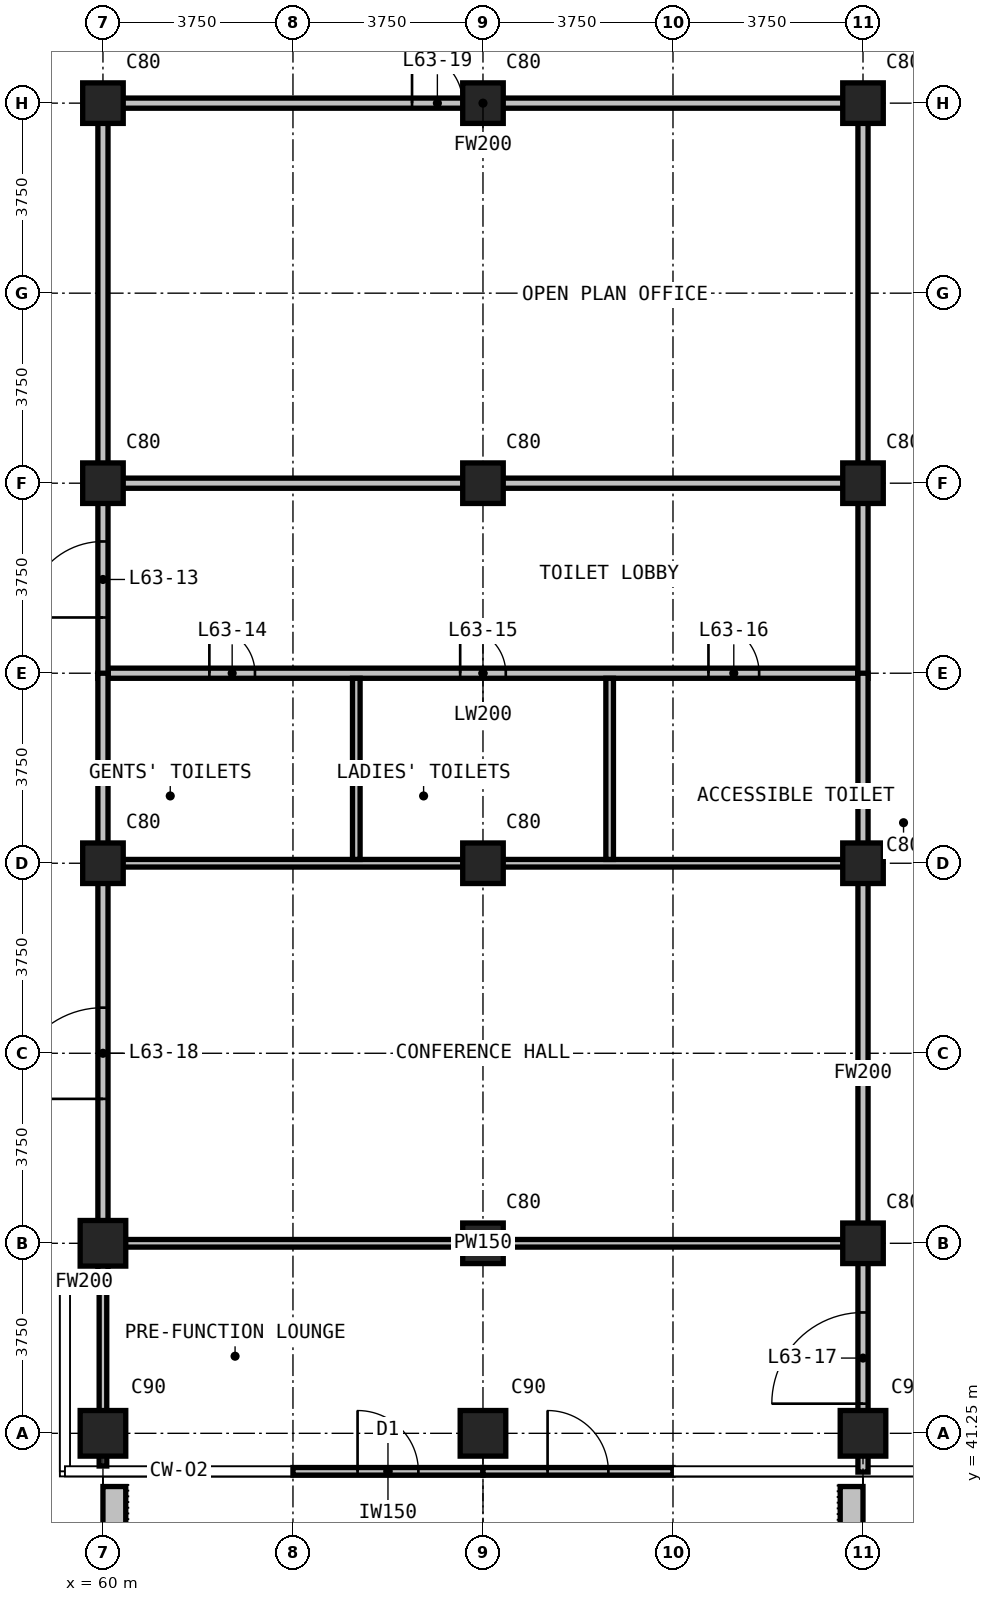
"""IFC4 building model, lengths in metres.
Left out: names, types, materials, properties, quantities, classifications, styles, units other than length and angle.
Written with IfcOpenShell. Run it as: python <this file> out.ifc"""

import sys

from ifc_helpers import new_model, si_unit, direction, frame, frame_2d, origin, origin_2d, place, context, subcontext, project, spatial, rectangle, extrude, element, fill, save


model = new_model("IFC4")
c1 = context("Model", 3, precision=1e-05, world=origin(), true_north=direction((0.0, 1.0)))
c2 = subcontext(c1, "Body", "Model", "MODEL_VIEW")
j1 = project(units=[si_unit("LENGTHUNIT", "METRE"), si_unit("PLANEANGLEUNIT", "RADIAN")], contexts=[c1])
p1 = place(None, origin())
s1 = spatial("IfcSite", under=j1, at=p1, CompositionType="ELEMENT")
p2 = place(p1, origin())
s2 = spatial("IfcBuilding", under=s1, at=p2, CompositionType="ELEMENT")
p3 = place(p2, frame((0.0, 0.0, 242.7)))
s3 = spatial("IfcBuildingStorey", under=s2, at=p3, CompositionType="ELEMENT", Elevation=242.7)
for number, where, z_axis, x_axis in (
    (1, (60.0, 41.25, 0.0), (0.0, 0.0, 1.0), (1.0, 0.0, 0.0)),
    (2, (60.0, 45.0, 0.0), (0.0, 0.0, 1.0), (1.0, 0.0, 0.0)),
):
    element("IfcColumn", number, at=place(p3, frame(where, z_axis=z_axis, x_axis=x_axis)), inside=s3, PredefinedType="COLUMN", context=c2, shape_type="SweptSolid", body=[
        extrude(rectangle(XDim=0.9, YDim=0.9, at=origin_2d()), origin(), (0.0, 0.0, 1.0), 3.6),
    ])
for number, where, z_axis, x_axis in (
    (3, (60.0, 52.5, 0.0), (0.0, 0.0, 1.0), (1.0, 0.0, 0.0)),
    (4, (60.0, 60.0, 0.0), (0.0, 0.0, 1.0), (1.0, 0.0, 0.0)),
    (5, (60.0, 67.5, 0.0), (0.0, 0.0, 1.0), (1.0, 0.0, 0.0)),
):
    element("IfcColumn", number, at=place(p3, frame(where, z_axis=z_axis, x_axis=x_axis)), inside=s3, PredefinedType="COLUMN", context=c2, shape_type="SweptSolid", body=[
        extrude(rectangle(XDim=0.8, YDim=0.8, at=origin_2d()), origin(), (0.0, 0.0, 1.0), 3.6),
    ])
p4 = place(p3, frame((67.5, 41.25, 0.0), z_axis=(0.0, 0.0, 1.0), x_axis=(1.0, 0.0, 0.0)))
e6 = element("IfcColumn", 6, at=p4, inside=s3, PredefinedType="COLUMN", context=c2, shape_type="SweptSolid", body=[
    extrude(rectangle(XDim=0.9, YDim=0.9, at=origin_2d()), origin(), (0.0, 0.0, 1.0), 3.6),
])
for number, where, z_axis, x_axis in (
    (7, (67.5, 45.0, 0.0), (0.0, 0.0, 1.0), (1.0, 0.0, 0.0)),
    (8, (67.5, 52.5, 0.0), (0.0, 0.0, 1.0), (1.0, 0.0, 0.0)),
    (9, (67.5, 60.0, 0.0), (0.0, 0.0, 1.0), (1.0, 0.0, 0.0)),
    (10, (67.5, 67.5, 0.0), (0.0, 0.0, 1.0), (1.0, 0.0, 0.0)),
):
    element("IfcColumn", number, at=place(p3, frame(where, z_axis=z_axis, x_axis=x_axis)), inside=s3, PredefinedType="COLUMN", context=c2, shape_type="SweptSolid", body=[
        extrude(rectangle(XDim=0.8, YDim=0.8, at=origin_2d()), origin(), (0.0, 0.0, 1.0), 3.6),
    ])
p5 = place(p3, frame((75.0, 41.25, 0.0), z_axis=(0.0, 0.0, 1.0), x_axis=(1.0, 0.0, 0.0)))
e11 = element("IfcColumn", 11, at=p5, inside=s3, PredefinedType="COLUMN", context=c2, shape_type="SweptSolid", body=[
    extrude(rectangle(XDim=0.9, YDim=0.9, at=origin_2d()), origin(), (0.0, 0.0, 1.0), 3.6),
])
for number, where, z_axis, x_axis in (
    (12, (75.0, 45.0, 0.0), (0.0, 0.0, 1.0), (1.0, 0.0, 0.0)),
    (13, (75.0, 52.5, 0.0), (0.0, 0.0, 1.0), (1.0, 0.0, 0.0)),
    (14, (75.0, 60.0, 0.0), (0.0, 0.0, 1.0), (1.0, 0.0, 0.0)),
    (15, (75.0, 67.5, 0.0), (0.0, 0.0, 1.0), (1.0, 0.0, 0.0)),
):
    element("IfcColumn", number, at=place(p3, frame(where, z_axis=z_axis, x_axis=x_axis)), inside=s3, PredefinedType="COLUMN", context=c2, shape_type="SweptSolid", body=[
        extrude(rectangle(XDim=0.8, YDim=0.8, at=origin_2d()), origin(), (0.0, 0.0, 1.0), 3.6),
    ])
p6 = place(p3, frame((63.75, 40.5, 0.0), z_axis=(0.0, 0.0, 1.0), x_axis=(1.0, 0.0, 0.0)))
e16 = element("IfcWall", 16, at=p6, inside=s3, PredefinedType="SOLIDWALL", context=c2, shape_type="SweptSolid", body=[
    extrude(rectangle(XDim=3.75, YDim=0.15, at=frame_2d((1.875, 0.0))), origin(), (0.0, 0.0, 1.0), 3.3),
])
p7 = place(p6, frame((1.275, 0.0, 0.0)))
e17 = element("IfcOpeningElement", 17, at=p7, cuts=e16, PredefinedType="OPENING", context=c2, shape_type="SweptSolid", body=[
    extrude(rectangle(XDim=1.2, YDim=2.4, at=frame_2d((0.6, 1.2))), frame((0.0, 0.085, 0.0), z_axis=(0.0, -1.0, 0.0), x_axis=(1.0, 0.0, 0.0)), (0.0, 0.0, 1.0), 0.17),
])
p8 = place(p3, frame((67.5, 40.5, 0.0), z_axis=(0.0, 0.0, 1.0), x_axis=(1.0, 0.0, 0.0)))
e18 = element("IfcWall", 18, at=p8, inside=s3, PredefinedType="SOLIDWALL", context=c2, shape_type="SweptSolid", body=[
    extrude(rectangle(XDim=3.75, YDim=0.15, at=frame_2d((1.875, 0.0))), origin(), (0.0, 0.0, 1.0), 3.3),
])
p9 = place(p8, frame((1.275, 0.0, 0.0)))
e19 = element("IfcOpeningElement", 19, at=p9, cuts=e18, PredefinedType="OPENING", context=c2, shape_type="SweptSolid", body=[
    extrude(rectangle(XDim=1.2, YDim=2.4, at=frame_2d((0.6, 1.2))), frame((0.0, 0.085, 0.0), z_axis=(0.0, -1.0, 0.0), x_axis=(1.0, 0.0, 0.0)), (0.0, 0.0, 1.0), 0.17),
])
for number, where, z_axis, x_axis in (
    (20, (60.225, 40.2, 0.0), (0.0, 0.0, 1.0), (0.0, -1.0, 0.0)),
    (21, (74.775, 40.2, 0.0), (0.0, 0.0, 1.0), (0.0, -1.0, 0.0)),
):
    element("IfcWall", number, at=place(p3, frame(where, z_axis=z_axis, x_axis=x_axis)), inside=s3, PredefinedType="USERDEFINED", context=c2, shape_type="SweptSolid", body=[
        extrude(rectangle(XDim=2.35, YDim=0.45, at=frame_2d((1.175, 0.0))), origin(), (0.0, 0.0, 1.0), 1.1),
    ])
p10 = place(p3, frame((60.1, 56.25, 0.0), z_axis=(0.0, 0.0, 1.0), x_axis=(1.0, 0.0, 0.0)))
e22 = element("IfcWall", 22, at=p10, inside=s3, PredefinedType="PARTITIONING", context=c2, shape_type="SweptSolid", body=[
    extrude(rectangle(XDim=14.8, YDim=0.2, at=frame_2d((7.4, 0.0))), origin(), (0.0, 0.0, 1.0), 3.3),
])
p11 = place(p10, frame((2.0, 0.0, 0.0)))
e23 = element("IfcOpeningElement", 23, at=p11, cuts=e22, PredefinedType="OPENING", context=c2, shape_type="SweptSolid", body=[
    extrude(rectangle(XDim=0.9, YDim=2.2, at=frame_2d((0.45, 1.1))), frame((0.0, 0.11, 0.0), z_axis=(0.0, -1.0, 0.0), x_axis=(1.0, 0.0, 0.0)), (0.0, 0.0, 1.0), 0.22),
])
p12 = place(p10, frame((6.95, 0.0, 0.0)))
e24 = element("IfcOpeningElement", 24, at=p12, cuts=e22, PredefinedType="OPENING", context=c2, shape_type="SweptSolid", body=[
    extrude(rectangle(XDim=0.9, YDim=2.2, at=frame_2d((0.45, 1.1))), frame((0.0, 0.11, 0.0), z_axis=(0.0, -1.0, 0.0), x_axis=(1.0, 0.0, 0.0)), (0.0, 0.0, 1.0), 0.22),
])
p13 = place(p10, frame((11.85, 0.0, 0.0)))
e25 = element("IfcOpeningElement", 25, at=p13, cuts=e22, PredefinedType="OPENING", context=c2, shape_type="SweptSolid", body=[
    extrude(rectangle(XDim=1.0, YDim=2.2, at=frame_2d((0.5, 1.1))), frame((0.0, 0.11, 0.0), z_axis=(0.0, -1.0, 0.0), x_axis=(1.0, 0.0, 0.0)), (0.0, 0.0, 1.0), 0.22),
])
p14 = place(p3, frame((60.1, 60.0, 0.0), z_axis=(0.0, 0.0, 1.0), x_axis=(1.0, 0.0, 0.0)))
e26 = element("IfcWall", 26, at=p14, inside=s3, PredefinedType="PARTITIONING", context=c2, shape_type="SweptSolid", body=[
    extrude(rectangle(XDim=14.8, YDim=0.2, at=frame_2d((7.4, 0.0))), origin(), (0.0, 0.0, 1.0), 3.3),
])
p15 = place(p3, frame((60.0, 56.15, 0.0), z_axis=(0.0, 0.0, 1.0), x_axis=(0.0, 1.0, 0.0)))
e27 = element("IfcWall", 27, at=p15, inside=s3, PredefinedType="PARTITIONING", context=c2, shape_type="SweptSolid", body=[
    extrude(rectangle(XDim=3.95, YDim=0.2, at=frame_2d((1.975, 0.0))), origin(), (0.0, 0.0, 1.0), 3.3),
])
p16 = place(p15, frame((1.2, 0.0, 0.0)))
e28 = element("IfcOpeningElement", 28, at=p16, cuts=e27, PredefinedType="OPENING", context=c2, shape_type="SweptSolid", body=[
    extrude(rectangle(XDim=1.5, YDim=2.2, at=frame_2d((0.75, 1.1))), frame((0.0, 0.11, 0.0), z_axis=(0.0, -1.0, 0.0), x_axis=(1.0, 0.0, 0.0)), (0.0, 0.0, 1.0), 0.22),
])
p17 = place(p3, frame((75.0, 56.15, 0.0), z_axis=(0.0, 0.0, 1.0), x_axis=(0.0, 1.0, 0.0)))
e29 = element("IfcWall", 29, at=p17, inside=s3, PredefinedType="PARTITIONING", context=c2, shape_type="SweptSolid", body=[
    extrude(rectangle(XDim=3.95, YDim=0.2, at=frame_2d((1.975, 0.0))), origin(), (0.0, 0.0, 1.0), 3.3),
])
p18 = place(p3, frame((59.355, 44.235, 0.0), z_axis=(0.0, 0.0, 1.0), x_axis=(1.0, 0.0, 0.0)))
e30 = element("IfcWall", 30, at=p18, inside=s3, PredefinedType="PARTITIONING", context=c2, shape_type="SweptSolid", body=[
    extrude(rectangle(XDim=0.545, YDim=0.2, at=frame_2d((0.272, 0.0))), origin(), (0.0, 0.0, 1.0), 3.3),
])
p19 = place(p3, frame((60.1, 67.5, 0.0), z_axis=(0.0, 0.0, 1.0), x_axis=(1.0, 0.0, 0.0)))
e31 = element("IfcWall", 31, at=p19, inside=s3, PredefinedType="PARTITIONING", context=c2, shape_type="SweptSolid", body=[
    extrude(rectangle(XDim=14.8, YDim=0.2, at=frame_2d((7.4, 0.0))), origin(), (0.0, 0.0, 1.0), 3.3),
])
p20 = place(p19, frame((6.0, 0.0, 0.0)))
e32 = element("IfcOpeningElement", 32, at=p20, cuts=e31, PredefinedType="OPENING", context=c2, shape_type="SweptSolid", body=[
    extrude(rectangle(XDim=1.0, YDim=2.2, at=frame_2d((0.5, 1.1))), frame((0.0, 0.11, 0.0), z_axis=(0.0, -1.0, 0.0), x_axis=(1.0, 0.0, 0.0)), (0.0, 0.0, 1.0), 0.22),
])
p21 = place(p3, frame((60.0, 44.135, 0.0), z_axis=(0.0, 0.0, 1.0), x_axis=(0.0, 1.0, 0.0)))
e33 = element("IfcWall", 33, at=p21, inside=s3, PredefinedType="PARTITIONING", context=c2, shape_type="SweptSolid", body=[
    extrude(rectangle(XDim=12.115, YDim=0.2, at=frame_2d((6.058, 0.0))), origin(), (0.0, 0.0, 1.0), 3.3),
])
p22 = place(p21, frame((3.715, 0.0, 0.0)))
e34 = element("IfcOpeningElement", 34, at=p22, cuts=e33, PredefinedType="OPENING", context=c2, shape_type="SweptSolid", body=[
    extrude(rectangle(XDim=1.8, YDim=2.2, at=frame_2d((0.9, 1.1))), frame((0.0, 0.11, 0.0), z_axis=(0.0, -1.0, 0.0), x_axis=(1.0, 0.0, 0.0)), (0.0, 0.0, 1.0), 0.22),
])
p23 = place(p3, frame((60.0, 60.0, 0.0), z_axis=(0.0, 0.0, 1.0), x_axis=(0.0, 1.0, 0.0)))
e35 = element("IfcWall", 35, at=p23, inside=s3, PredefinedType="PARTITIONING", context=c2, shape_type="SweptSolid", body=[
    extrude(rectangle(XDim=7.6, YDim=0.2, at=frame_2d((3.8, 0.0))), origin(), (0.0, 0.0, 1.0), 3.3),
])
p24 = place(p3, frame((75.0, 40.485, 0.0), z_axis=(0.0, 0.0, 1.0), x_axis=(0.0, 1.0, 0.0)))
e36 = element("IfcWall", 36, at=p24, inside=s3, PredefinedType="PARTITIONING", context=c2, shape_type="SweptSolid", body=[
    extrude(rectangle(XDim=15.765, YDim=0.2, at=frame_2d((7.882, 0.0))), origin(), (0.0, 0.0, 1.0), 3.3),
])
p25 = place(p24, frame((1.35, 0.0, 0.0)))
e37 = element("IfcOpeningElement", 37, at=p25, cuts=e36, PredefinedType="OPENING", context=c2, shape_type="SweptSolid", body=[
    extrude(rectangle(XDim=1.8, YDim=2.2, at=frame_2d((0.9, 1.1))), frame((0.0, 0.11, 0.0), z_axis=(0.0, -1.0, 0.0), x_axis=(1.0, 0.0, 0.0)), (0.0, 0.0, 1.0), 0.22),
])
p26 = place(p3, frame((75.0, 60.0, 0.0), z_axis=(0.0, 0.0, 1.0), x_axis=(0.0, 1.0, 0.0)))
e38 = element("IfcWall", 38, at=p26, inside=s3, PredefinedType="PARTITIONING", context=c2, shape_type="SweptSolid", body=[
    extrude(rectangle(XDim=7.6, YDim=0.2, at=frame_2d((3.8, 0.0))), origin(), (0.0, 0.0, 1.0), 3.3),
])
for number, where, z_axis, x_axis in (
    (39, (60.1, 45.0, 0.0), (0.0, 0.0, 1.0), (1.0, 0.0, 0.0)),
    (40, (60.1, 52.5, 0.0), (0.0, 0.0, 1.0), (1.0, 0.0, 0.0)),
):
    element("IfcWall", number, at=place(p3, frame(where, z_axis=z_axis, x_axis=x_axis)), inside=s3, PredefinedType="PARTITIONING", context=c2, shape_type="SweptSolid", body=[
        extrude(rectangle(XDim=14.8, YDim=0.15, at=frame_2d((7.4, 0.0))), origin(), (0.0, 0.0, 1.0), 3.3),
    ])
p27 = place(p3, frame((60.0, 40.605, 0.0), z_axis=(0.0, 0.0, 1.0), x_axis=(0.0, 1.0, 0.0)))
e41 = element("IfcWall", 41, at=p27, inside=s3, PredefinedType="PARTITIONING", context=c2, shape_type="SweptSolid", body=[
    extrude(rectangle(XDim=3.6, YDim=0.15, at=frame_2d((1.8, 0.0))), origin(), (0.0, 0.0, 1.0), 3.3),
])
for number, where, z_axis, x_axis in (
    (42, (65.0, 52.575, 0.0), (0.0, 0.0, 1.0), (0.0, 1.0, 0.0)),
    (43, (70.0, 52.575, 0.0), (0.0, 0.0, 1.0), (0.0, 1.0, 0.0)),
):
    element("IfcWall", number, at=place(p3, frame(where, z_axis=z_axis, x_axis=x_axis)), inside=s3, PredefinedType="PARTITIONING", context=c2, shape_type="SweptSolid", body=[
        extrude(rectangle(XDim=3.575, YDim=0.15, at=frame_2d((1.788, 0.0))), origin(), (0.0, 0.0, 1.0), 3.3),
    ])
p28 = place(p7, origin())
e44 = element("IfcDoor", 44, at=p28, inside=s3, OperationType="SINGLE_SWING_LEFT", PredefinedType="DOOR", context=c2, shape_type="SweptSolid", body=[
    extrude(rectangle(XDim=1.2, YDim=2.4, at=frame_2d((0.6, 1.2))), frame((0.0, 0.025, 0.0), z_axis=(0.0, -1.0, 0.0), x_axis=(1.0, 0.0, 0.0)), (0.0, 0.0, 1.0), 0.05),
])
fill(e17, e44)
p29 = place(p9, origin())
e45 = element("IfcDoor", 45, at=p29, inside=s3, OperationType="SINGLE_SWING_LEFT", PredefinedType="DOOR", context=c2, shape_type="SweptSolid", body=[
    extrude(rectangle(XDim=1.2, YDim=2.4, at=frame_2d((0.6, 1.2))), frame((0.0, 0.025, 0.0), z_axis=(0.0, -1.0, 0.0), x_axis=(1.0, 0.0, 0.0)), (0.0, 0.0, 1.0), 0.05),
])
fill(e19, e45)
p30 = place(p16, origin())
e46 = element("IfcDoor", 46, at=p30, inside=s3, OperationType="DOUBLE_DOOR_SINGLE_SWING", PredefinedType="DOOR", context=c2, shape_type="SweptSolid", body=[
    extrude(rectangle(XDim=1.5, YDim=2.2, at=frame_2d((0.75, 1.1))), frame((0.0, 0.025, 0.0), z_axis=(0.0, -1.0, 0.0), x_axis=(1.0, 0.0, 0.0)), (0.0, 0.0, 1.0), 0.05),
])
fill(e28, e46)
p31 = place(p11, origin())
e47 = element("IfcDoor", 47, at=p31, inside=s3, OperationType="SINGLE_SWING_LEFT", PredefinedType="DOOR", context=c2, shape_type="SweptSolid", body=[
    extrude(rectangle(XDim=0.9, YDim=2.2, at=frame_2d((0.45, 1.1))), frame((0.0, 0.025, 0.0), z_axis=(0.0, -1.0, 0.0), x_axis=(1.0, 0.0, 0.0)), (0.0, 0.0, 1.0), 0.05),
])
fill(e23, e47)
p32 = place(p12, origin())
e48 = element("IfcDoor", 48, at=p32, inside=s3, OperationType="SINGLE_SWING_LEFT", PredefinedType="DOOR", context=c2, shape_type="SweptSolid", body=[
    extrude(rectangle(XDim=0.9, YDim=2.2, at=frame_2d((0.45, 1.1))), frame((0.0, 0.025, 0.0), z_axis=(0.0, -1.0, 0.0), x_axis=(1.0, 0.0, 0.0)), (0.0, 0.0, 1.0), 0.05),
])
fill(e24, e48)
p33 = place(p13, origin())
e49 = element("IfcDoor", 49, at=p33, inside=s3, OperationType="SINGLE_SWING_LEFT", PredefinedType="DOOR", context=c2, shape_type="SweptSolid", body=[
    extrude(rectangle(XDim=1.0, YDim=2.2, at=frame_2d((0.5, 1.1))), frame((0.0, 0.025, 0.0), z_axis=(0.0, -1.0, 0.0), x_axis=(1.0, 0.0, 0.0)), (0.0, 0.0, 1.0), 0.05),
])
fill(e25, e49)
p34 = place(p25, origin())
e50 = element("IfcDoor", 50, at=p34, inside=s3, OperationType="DOUBLE_DOOR_SINGLE_SWING", PredefinedType="DOOR", context=c2, shape_type="SweptSolid", body=[
    extrude(rectangle(XDim=1.8, YDim=2.2, at=frame_2d((0.9, 1.1))), frame((0.0, 0.025, 0.0), z_axis=(0.0, -1.0, 0.0), x_axis=(1.0, 0.0, 0.0)), (0.0, 0.0, 1.0), 0.05),
])
fill(e37, e50)
p35 = place(p22, origin())
e51 = element("IfcDoor", 51, at=p35, inside=s3, OperationType="DOUBLE_DOOR_SINGLE_SWING", PredefinedType="DOOR", context=c2, shape_type="SweptSolid", body=[
    extrude(rectangle(XDim=1.8, YDim=2.2, at=frame_2d((0.9, 1.1))), frame((0.0, 0.025, 0.0), z_axis=(0.0, -1.0, 0.0), x_axis=(1.0, 0.0, 0.0)), (0.0, 0.0, 1.0), 0.05),
])
fill(e34, e51)
p36 = place(p20, origin())
e52 = element("IfcDoor", 52, at=p36, inside=s3, OperationType="SINGLE_SWING_RIGHT", PredefinedType="DOOR", context=c2, shape_type="SweptSolid", body=[
    extrude(rectangle(XDim=1.0, YDim=2.2, at=frame_2d((0.5, 1.1))), frame((0.0, 0.025, 0.0), z_axis=(0.0, -1.0, 0.0), x_axis=(1.0, 0.0, 0.0)), (0.0, 0.0, 1.0), 0.05),
])
fill(e32, e52)
save(model, sys.argv[1])
